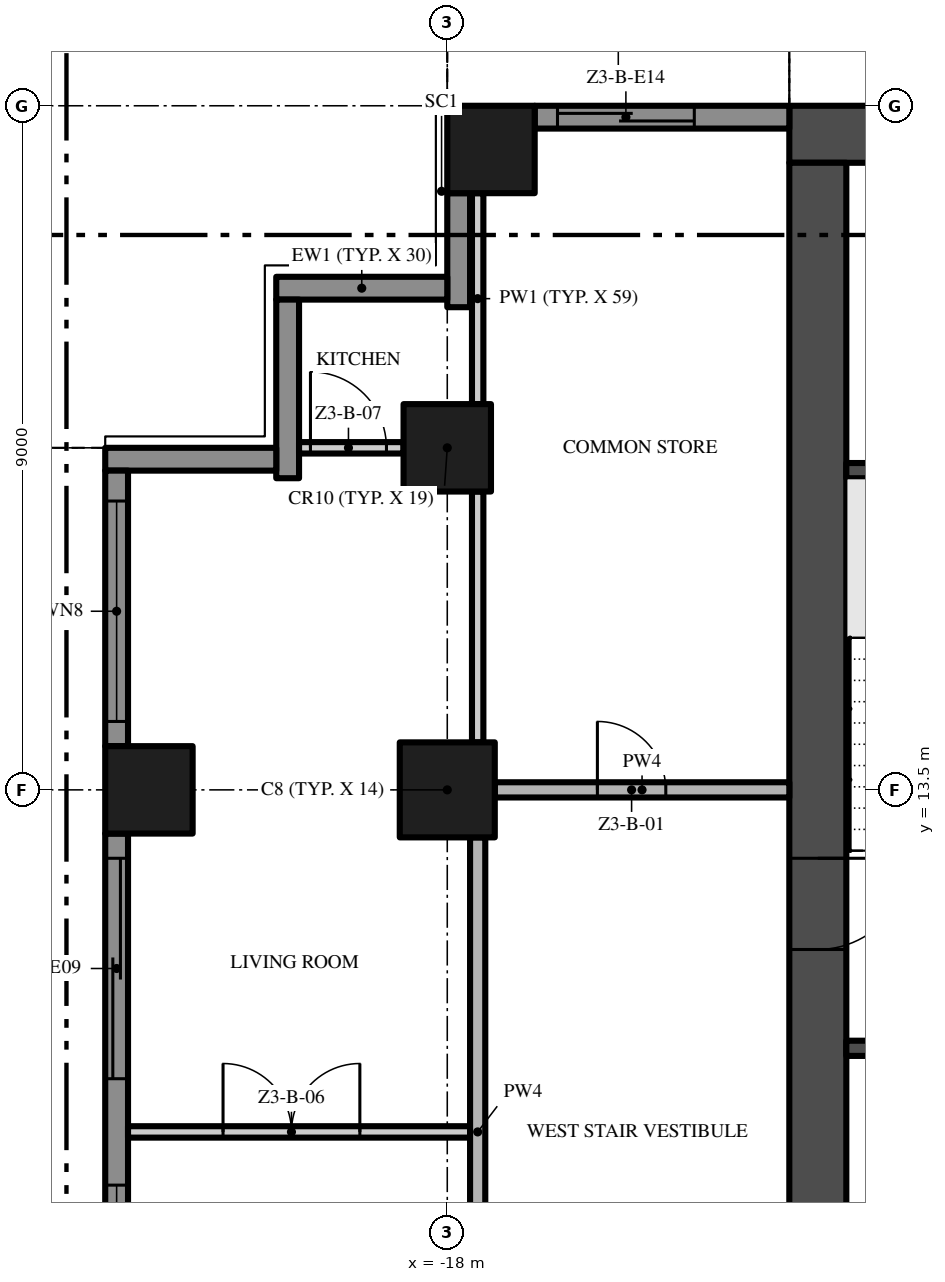
"""IFC4 building model, lengths in metres.
Left out: names, types, materials, properties, quantities, classifications, styles, units other than length and angle.
Written with IfcOpenShell. Run it as: python <this file> out.ifc"""

import sys

from ifc_helpers import new_model, si_unit, direction, frame, frame_2d, origin, origin_2d, place, context, subcontext, project, spatial, polyline, rectangle, outline, extrude, element, fill, save


model = new_model("IFC4")
c1 = context("Model", 3, precision=1e-05, world=origin(), true_north=direction((0.0, 1.0)))
c2 = subcontext(c1, "Body", "Model", "MODEL_VIEW")
j1 = project(units=[si_unit("LENGTHUNIT", "METRE"), si_unit("PLANEANGLEUNIT", "RADIAN")], contexts=[c1])
p1 = place(None, origin())
s1 = spatial("IfcSite", under=j1, at=p1, CompositionType="ELEMENT")
p2 = place(p1, origin())
s2 = spatial("IfcBuilding", under=s1, at=p2, CompositionType="ELEMENT")
p3 = place(p2, frame((0.0, 0.0, 140.2)))
s3 = spatial("IfcBuildingStorey", under=s2, at=p3, CompositionType="ELEMENT", Elevation=140.2)
p4 = place(p3, frame((13.5, 22.125, -0.3), z_axis=(0.0, 0.0, 1.0), x_axis=(-1.0, 0.0, 0.0)))
e1 = element("IfcWall", 1, at=p4, inside=s3, PredefinedType="SHEAR", context=c2, shape_type="SweptSolid", body=[
    extrude(rectangle(XDim=27.0, YDim=0.75, at=frame_2d((13.5, 0.0))), origin(), (0.0, 0.0, 1.0), 3.8),
])
p5 = place(p3, frame((-13.125, 21.75, -0.3), z_axis=(0.0, 0.0, 1.0), x_axis=(0.0, -1.0, 0.0)))
e2 = element("IfcWall", 2, at=p5, inside=s3, PredefinedType="SHEAR", context=c2, shape_type="SweptSolid", body=[
    extrude(rectangle(XDim=16.5, YDim=0.75, at=frame_2d((8.25, 0.0))), origin(), (0.0, 0.0, 1.0), 3.8),
])
p6 = place(p5, frame((9.15, 0.0, 0.3)))
e3 = element("IfcOpeningElement", 3, at=p6, cuts=e2, PredefinedType="OPENING", context=c2, shape_type="SweptSolid", body=[
    extrude(rectangle(XDim=1.2, YDim=2.2, at=frame_2d((0.6, 1.1))), frame((0.0, 0.385, 0.0), z_axis=(0.0, -1.0, 0.0), x_axis=(1.0, 0.0, 0.0)), (0.0, 0.0, 1.0), 0.77),
])
p7 = place(p3, frame((-18.0, 13.5, 0.0), z_axis=(0.0, 0.0, 1.0), x_axis=(1.0, 0.0, 0.0)))
e4 = element("IfcColumn", 4, at=p7, inside=s3, PredefinedType="COLUMN", context=c2, shape_type="SweptSolid", body=[
    extrude(rectangle(XDim=1.25, YDim=1.25, at=origin_2d()), origin(), (0.0, 0.0, 1.0), 3.5),
])
for number, where, z_axis, x_axis in (
    (5, (-17.425, 21.925, 0.0), (0.0, 0.0, 1.0), (1.0, 0.0, 0.0)),
    (6, (-21.925, 13.5, 0.0), (0.0, 0.0, 1.0), (1.0, 0.0, 0.0)),
    (7, (-18.0, 18.0, 0.0), (0.0, 0.0, 1.0), (1.0, 0.0, 0.0)),
):
    element("IfcColumn", number, at=place(p3, frame(where, z_axis=z_axis, x_axis=x_axis)), inside=s3, PredefinedType="COLUMN", context=c2, shape_type="SweptSolid", body=[
        extrude(rectangle(XDim=1.15, YDim=1.15, at=origin_2d()), origin(), (0.0, 0.0, 1.0), 3.5),
    ])
p8 = place(p3, frame((-16.85, 22.35, 0.0), z_axis=(0.0, 0.0, 1.0), x_axis=(1.0, 0.0, 0.0)))
e8 = element("IfcWall", 8, at=p8, inside=s3, PredefinedType="SOLIDWALL", context=c2, shape_type="SweptSolid", body=[
    extrude(rectangle(XDim=3.35, YDim=0.3, at=frame_2d((1.675, 0.0))), origin(), (0.0, 0.0, 1.0), 3.5),
])
p9 = place(p8, frame((0.3, 0.0, 0.0)))
e9 = element("IfcOpeningElement", 9, at=p9, cuts=e8, PredefinedType="OPENING", context=c2, shape_type="SweptSolid", body=[
    extrude(rectangle(XDim=1.8, YDim=2.4, at=frame_2d((0.9, 1.2))), frame((0.0, 0.16, 0.0), z_axis=(0.0, -1.0, 0.0), x_axis=(1.0, 0.0, 0.0)), (0.0, 0.0, 1.0), 0.32),
])
p10 = place(p3, frame((-17.85, 19.85, 0.0), z_axis=(0.0, 0.0, 1.0), x_axis=(0.0, 1.0, 0.0)))
e10 = element("IfcWall", 10, at=p10, inside=s3, PredefinedType="SOLIDWALL", context=c2, shape_type="SweptSolid", body=[
    extrude(rectangle(XDim=1.5, YDim=0.3, at=frame_2d((0.75, 0.0))), origin(), (0.0, 0.0, 1.0), 3.5),
])
p11 = place(p3, frame((-20.25, 20.1, 0.0), z_axis=(0.0, 0.0, 1.0), x_axis=(1.0, 0.0, 0.0)))
e11 = element("IfcWall", 11, at=p11, inside=s3, PredefinedType="SOLIDWALL", context=c2, shape_type="SweptSolid", body=[
    extrude(rectangle(XDim=2.25, YDim=0.3, at=frame_2d((1.125, 0.0))), origin(), (0.0, 0.0, 1.0), 3.5),
])
p12 = place(p3, frame((-20.1, 17.6, 0.0), z_axis=(0.0, 0.0, 1.0), x_axis=(0.0, 1.0, 0.0)))
e12 = element("IfcWall", 12, at=p12, inside=s3, PredefinedType="SOLIDWALL", context=c2, shape_type="SweptSolid", body=[
    extrude(rectangle(XDim=2.35, YDim=0.3, at=frame_2d((1.175, 0.0))), origin(), (0.0, 0.0, 1.0), 3.5),
])
p13 = place(p3, frame((-22.5, 17.85, 0.0), z_axis=(0.0, 0.0, 1.0), x_axis=(1.0, 0.0, 0.0)))
e13 = element("IfcWall", 13, at=p13, inside=s3, PredefinedType="SOLIDWALL", context=c2, shape_type="SweptSolid", body=[
    extrude(rectangle(XDim=2.25, YDim=0.3, at=frame_2d((1.125, 0.0))), origin(), (0.0, 0.0, 1.0), 3.5),
])
p14 = place(p3, frame((-22.35, 14.075, 0.0), z_axis=(0.0, 0.0, 1.0), x_axis=(0.0, 1.0, 0.0)))
e14 = element("IfcWall", 14, at=p14, inside=s3, PredefinedType="SOLIDWALL", context=c2, shape_type="SweptSolid", body=[
    extrude(rectangle(XDim=3.625, YDim=0.3, at=frame_2d((1.812, 0.0))), origin(), (0.0, 0.0, 1.0), 3.5),
])
p15 = place(p14, frame((0.325, 0.0, 0.45)))
e15 = element("IfcOpeningElement", 15, at=p15, cuts=e14, PredefinedType="OPENING", context=c2, shape_type="SweptSolid", body=[
    extrude(rectangle(XDim=2.9, YDim=2.65, at=frame_2d((1.45, 1.325))), frame((0.0, 0.16, 0.0), z_axis=(0.0, -1.0, 0.0), x_axis=(1.0, 0.0, 0.0)), (0.0, 0.0, 1.0), 0.32),
])
p16 = place(p3, frame((-22.35, 5.075, 0.0), z_axis=(0.0, 0.0, 1.0), x_axis=(0.0, 1.0, 0.0)))
e16 = element("IfcWall", 16, at=p16, inside=s3, PredefinedType="SOLIDWALL", context=c2, shape_type="SweptSolid", body=[
    extrude(rectangle(XDim=7.85, YDim=0.3, at=frame_2d((3.925, 0.0))), origin(), (0.0, 0.0, 1.0), 3.5),
])
p17 = place(p16, frame((4.625, 0.0, 0.0)))
e17 = element("IfcOpeningElement", 17, at=p17, cuts=e16, PredefinedType="OPENING", context=c2, shape_type="SweptSolid", body=[
    extrude(rectangle(XDim=2.9, YDim=2.4, at=frame_2d((1.45, 1.2))), frame((0.0, 0.16, 0.0), z_axis=(0.0, -1.0, 0.0), x_axis=(1.0, 0.0, 0.0)), (0.0, 0.0, 1.0), 0.32),
])
p18 = place(p16, frame((0.325, 0.0, 0.45)))
e18 = element("IfcOpeningElement", 18, at=p18, cuts=e16, PredefinedType="OPENING", context=c2, shape_type="SweptSolid", body=[
    extrude(rectangle(XDim=2.9, YDim=2.65, at=frame_2d((1.45, 1.325))), frame((0.0, 0.16, 0.0), z_axis=(0.0, -1.0, 0.0), x_axis=(1.0, 0.0, 0.0)), (0.0, 0.0, 1.0), 0.32),
])
p19 = place(p3, origin())
e19 = element("IfcWall", 19, at=p19, inside=s3, PredefinedType="USERDEFINED", context=c2, shape_type="SweptSolid", body=[
    extrude(outline(polyline([(-23.451, 18.0), (-24.112, 16.5), (-24.845, 15.0), (-25.369, 13.5), (-25.5, 12.375), (-25.485, 12.0), (-25.149, 10.5), (-24.488, 9.0), (-23.755, 7.5), (-23.231, 6.0), (-23.1, 4.875), (-23.115, 4.5), (-23.451, 3.0), (-24.112, 1.5), (-24.845, 0.0), (-25.369, -1.5), (-25.5, -2.625), (-25.485, -3.0), (-25.149, -4.5), (-24.488, -6.0), (-23.755, -7.5), (-23.231, -9.0), (-23.1, -10.125), (-23.115, -10.5), (-23.451, -12.0), (-24.112, -13.5), (-23.883, -13.601), (-23.213, -12.079), (-22.866, -10.533), (-22.849, -10.115), (-22.986, -8.944), (-23.524, -7.404), (-24.261, -5.895), (-24.91, -4.421), (-25.236, -2.967), (-25.249, -2.635), (-25.124, -1.556), (-24.614, -0.096), (-23.885, 1.395), (-23.213, 2.921), (-22.866, 4.467), (-22.849, 4.885), (-22.986, 6.056), (-23.524, 7.596), (-24.261, 9.105), (-24.91, 10.579), (-25.236, 12.033), (-25.249, 12.365), (-25.124, 13.444), (-24.614, 14.904), (-23.885, 16.395), (-23.223, 17.899), (-23.451, 18.0)])), origin(), (0.0, 0.0, 1.0), 0.9),
])
for number, where, z_axis, x_axis in (
    (20, (-12.75, 10.1, 0.0), (0.0, 0.0, 1.0), (1.0, 0.0, 0.0)),
    (21, (-12.75, 17.7, 0.0), (0.0, 0.0, 1.0), (1.0, 0.0, 0.0)),
):
    element("IfcWall", number, at=place(p3, frame(where, z_axis=z_axis, x_axis=x_axis)), inside=s3, PredefinedType="SHEAR", context=c2, shape_type="SweptSolid", body=[
        extrude(rectangle(XDim=3.1, YDim=0.2, at=frame_2d((1.55, 0.0))), origin(), (0.0, 0.0, 1.0), 3.5),
    ])
p20 = place(p3, frame((-22.2, 9.0, 0.0), z_axis=(0.0, 0.0, 1.0), x_axis=(1.0, 0.0, 0.0)))
e22 = element("IfcWall", 22, at=p20, inside=s3, PredefinedType="PARTITIONING", context=c2, shape_type="SweptSolid", body=[
    extrude(rectangle(XDim=4.5, YDim=0.15, at=frame_2d((2.25, 0.0))), origin(), (0.0, 0.0, 1.0), 3.5),
])
p21 = place(p20, frame((1.25, 0.0, 0.0)))
e23 = element("IfcOpeningElement", 23, at=p21, cuts=e22, PredefinedType="OPENING", context=c2, shape_type="SweptSolid", body=[
    extrude(rectangle(XDim=1.8, YDim=2.4, at=frame_2d((0.9, 1.2))), frame((0.0, 0.085, 0.0), z_axis=(0.0, -1.0, 0.0), x_axis=(1.0, 0.0, 0.0)), (0.0, 0.0, 1.0), 0.17),
])
p22 = place(p3, frame((-17.375, 13.5, 0.0), z_axis=(0.0, 0.0, 1.0), x_axis=(1.0, 0.0, 0.0)))
e24 = element("IfcWall", 24, at=p22, inside=s3, PredefinedType="PARTITIONING", context=c2, shape_type="SweptSolid", body=[
    extrude(rectangle(XDim=3.875, YDim=0.2, at=frame_2d((1.938, 0.0))), origin(), (0.0, 0.0, 1.0), 3.5),
])
p23 = place(p22, frame((1.35, 0.0, 0.0)))
e25 = element("IfcOpeningElement", 25, at=p23, cuts=e24, PredefinedType="OPENING", context=c2, shape_type="SweptSolid", body=[
    extrude(rectangle(XDim=0.9, YDim=2.1, at=frame_2d((0.45, 1.05))), frame((0.0, 0.11, 0.0), z_axis=(0.0, -1.0, 0.0), x_axis=(1.0, 0.0, 0.0)), (0.0, 0.0, 1.0), 0.22),
])
p24 = place(p3, frame((-19.95, 18.0, 0.0), z_axis=(0.0, 0.0, 1.0), x_axis=(1.0, 0.0, 0.0)))
e26 = element("IfcWall", 26, at=p24, inside=s3, PredefinedType="PARTITIONING", context=c2, shape_type="SweptSolid", body=[
    extrude(rectangle(XDim=1.375, YDim=0.15, at=frame_2d((0.688, 0.0))), origin(), (0.0, 0.0, 1.0), 3.5),
])
p25 = place(p24, frame((0.15, 0.0, 0.0)))
e27 = element("IfcOpeningElement", 27, at=p25, cuts=e26, PredefinedType="OPENING", context=c2, shape_type="SweptSolid", body=[
    extrude(rectangle(XDim=1.0, YDim=2.4, at=frame_2d((0.5, 1.2))), frame((0.0, 0.085, 0.0), z_axis=(0.0, -1.0, 0.0), x_axis=(1.0, 0.0, 0.0)), (0.0, 0.0, 1.0), 0.17),
])
p26 = place(p3, frame((-17.6, 5.125, 0.0), z_axis=(0.0, 0.0, 1.0), x_axis=(0.0, 1.0, 0.0)))
e28 = element("IfcWall", 28, at=p26, inside=s3, PredefinedType="PARTITIONING", context=c2, shape_type="SweptSolid", body=[
    extrude(rectangle(XDim=7.75, YDim=0.2, at=frame_2d((3.875, 0.0))), origin(), (0.0, 0.0, 1.0), 3.5),
])
p27 = place(p26, frame((1.0, 0.0, 0.0)))
e29 = element("IfcOpeningElement", 29, at=p27, cuts=e28, PredefinedType="OPENING", context=c2, shape_type="SweptSolid", body=[
    extrude(rectangle(XDim=1.2, YDim=2.4, at=frame_2d((0.6, 1.2))), frame((0.0, 0.11, 0.0), z_axis=(0.0, -1.0, 0.0), x_axis=(1.0, 0.0, 0.0)), (0.0, 0.0, 1.0), 0.22),
])
p28 = place(p3, frame((-17.6, 14.125, 0.0), z_axis=(0.0, 0.0, 1.0), x_axis=(0.0, 1.0, 0.0)))
e30 = element("IfcWall", 30, at=p28, inside=s3, PredefinedType="PARTITIONING", context=c2, shape_type="SweptSolid", body=[
    extrude(rectangle(XDim=3.3, YDim=0.15, at=frame_2d((1.65, 0.0))), origin(), (0.0, 0.0, 1.0), 3.5),
])
p29 = place(p3, frame((-17.6, 18.575, 0.0), z_axis=(0.0, 0.0, 1.0), x_axis=(0.0, 1.0, 0.0)))
e31 = element("IfcWall", 31, at=p29, inside=s3, PredefinedType="PARTITIONING", context=c2, shape_type="SweptSolid", body=[
    extrude(rectangle(XDim=2.775, YDim=0.15, at=frame_2d((1.387, 0.0))), origin(), (0.0, 0.0, 1.0), 3.5),
])
p30 = place(p9, origin())
e32 = element("IfcDoor", 32, at=p30, inside=s3, OperationType="SINGLE_SWING_LEFT", PredefinedType="DOOR", context=c2, shape_type="SweptSolid", body=[
    extrude(rectangle(XDim=1.8, YDim=2.4, at=frame_2d((0.9, 1.2))), frame((0.0, 0.025, 0.0), z_axis=(0.0, -1.0, 0.0), x_axis=(1.0, 0.0, 0.0)), (0.0, 0.0, 1.0), 0.05),
])
fill(e9, e32)
p31 = place(p15, origin())
e33 = element("IfcWindow", 33, at=p31, inside=s3, PartitioningType="SINGLE_PANEL", PredefinedType="WINDOW", context=c2, shape_type="SweptSolid", body=[
    extrude(rectangle(XDim=2.9, YDim=2.65, at=frame_2d((1.45, 1.325))), frame((0.0, 0.03, 0.0), z_axis=(0.0, -1.0, 0.0), x_axis=(1.0, 0.0, 0.0)), (0.0, 0.0, 1.0), 0.06),
])
fill(e15, e33)
p32 = place(p17, origin())
e34 = element("IfcDoor", 34, at=p32, inside=s3, OperationType="SINGLE_SWING_LEFT", PredefinedType="DOOR", context=c2, shape_type="SweptSolid", body=[
    extrude(rectangle(XDim=2.9, YDim=2.4, at=frame_2d((1.45, 1.2))), frame((0.0, 0.025, 0.0), z_axis=(0.0, -1.0, 0.0), x_axis=(1.0, 0.0, 0.0)), (0.0, 0.0, 1.0), 0.05),
])
fill(e17, e34)
p33 = place(p18, origin())
e35 = element("IfcWindow", 35, at=p33, inside=s3, PartitioningType="SINGLE_PANEL", PredefinedType="WINDOW", context=c2, shape_type="SweptSolid", body=[
    extrude(rectangle(XDim=2.9, YDim=2.65, at=frame_2d((1.45, 1.325))), frame((0.0, 0.03, 0.0), z_axis=(0.0, -1.0, 0.0), x_axis=(1.0, 0.0, 0.0)), (0.0, 0.0, 1.0), 0.06),
])
fill(e18, e35)
p34 = place(p6, frame((1.2, 0.0, 0.0), z_axis=(0.0, 0.0, 1.0), x_axis=(-1.0, 0.0, 0.0)))
e36 = element("IfcDoor", 36, at=p34, inside=s3, OperationType="SINGLE_SWING_RIGHT", PredefinedType="DOOR", context=c2, shape_type="SweptSolid", body=[
    extrude(rectangle(XDim=1.2, YDim=2.2, at=frame_2d((0.6, 1.1))), frame((0.0, 0.025, 0.0), z_axis=(0.0, -1.0, 0.0), x_axis=(1.0, 0.0, 0.0)), (0.0, 0.0, 1.0), 0.05),
])
fill(e3, e36)
p35 = place(p23, origin())
e37 = element("IfcDoor", 37, at=p35, inside=s3, OperationType="SINGLE_SWING_LEFT", PredefinedType="DOOR", context=c2, shape_type="SweptSolid", body=[
    extrude(rectangle(XDim=0.9, YDim=2.1, at=frame_2d((0.45, 1.05))), frame((0.0, 0.025, 0.0), z_axis=(0.0, -1.0, 0.0), x_axis=(1.0, 0.0, 0.0)), (0.0, 0.0, 1.0), 0.05),
])
fill(e25, e37)
p36 = place(p21, origin())
e38 = element("IfcDoor", 38, at=p36, inside=s3, OperationType="DOUBLE_DOOR_SINGLE_SWING", PredefinedType="DOOR", context=c2, shape_type="SweptSolid", body=[
    extrude(rectangle(XDim=1.8, YDim=2.4, at=frame_2d((0.9, 1.2))), frame((0.0, 0.025, 0.0), z_axis=(0.0, -1.0, 0.0), x_axis=(1.0, 0.0, 0.0)), (0.0, 0.0, 1.0), 0.05),
])
fill(e23, e38)
p37 = place(p25, origin())
e39 = element("IfcDoor", 39, at=p37, inside=s3, OperationType="SINGLE_SWING_LEFT", PredefinedType="DOOR", context=c2, shape_type="SweptSolid", body=[
    extrude(rectangle(XDim=1.0, YDim=2.4, at=frame_2d((0.5, 1.2))), frame((0.0, 0.025, 0.0), z_axis=(0.0, -1.0, 0.0), x_axis=(1.0, 0.0, 0.0)), (0.0, 0.0, 1.0), 0.05),
])
fill(e27, e39)
save(model, sys.argv[1])
